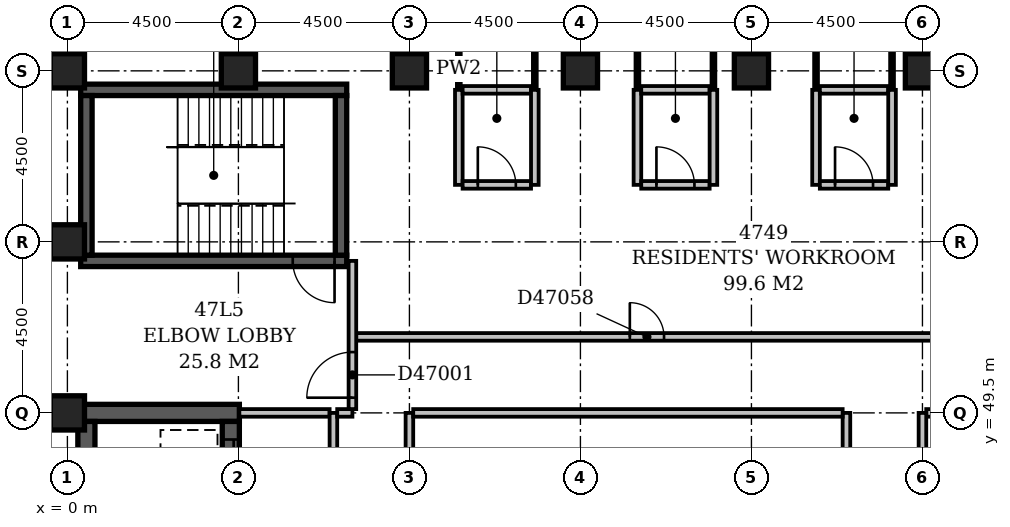
"""IFC4 building model, lengths in metres.
Left out: names, types, materials, properties, quantities, classifications, styles, units other than length and angle.
Written with IfcOpenShell. Run it as: python <this file> out.ifc"""

import sys

from ifc_helpers import new_model, si_unit, direction, frame, frame_2d, origin, origin_2d, place, context, subcontext, project, spatial, rectangle, extrude, element, fill, save


model = new_model("IFC4")
c1 = context("Model", 3, precision=1e-05, world=origin(), true_north=direction((0.0, 1.0)))
c2 = subcontext(c1, "Body", "Model", "MODEL_VIEW")
j1 = project(units=[si_unit("LENGTHUNIT", "METRE"), si_unit("PLANEANGLEUNIT", "RADIAN")], contexts=[c1])
p1 = place(None, origin())
s1 = spatial("IfcSite", under=j1, at=p1, CompositionType="ELEMENT")
p2 = place(p1, origin())
s2 = spatial("IfcBuilding", under=s1, at=p2, CompositionType="ELEMENT")
p3 = place(p2, frame((0.0, 0.0, 186.2)))
s3 = spatial("IfcBuildingStorey", under=s2, at=p3, CompositionType="ELEMENT", Elevation=186.2)
p4 = place(p3, frame((0.275, 49.5, -0.35), z_axis=(0.0, 0.0, 1.0), x_axis=(1.0, 0.0, 0.0)))
e1 = element("IfcWall", 1, at=p4, inside=s3, PredefinedType="SHEAR", context=c2, shape_type="SweptSolid", body=[
    extrude(rectangle(XDim=4.25, YDim=0.45, at=frame_2d((2.125, 0.0))), origin(), (0.0, 0.0, 1.0), 3.65),
])
p5 = place(p3, frame((0.35, 53.5, -0.35), z_axis=(0.0, 0.0, 1.0), x_axis=(1.0, 0.0, 0.0)))
e2 = element("IfcWall", 2, at=p5, inside=s3, PredefinedType="SHEAR", context=c2, shape_type="SweptSolid", body=[
    extrude(rectangle(XDim=7.0, YDim=0.3, at=frame_2d((3.5, 0.0))), origin(), (0.0, 0.0, 1.0), 3.65),
])
p6 = place(p5, frame((5.58, 0.0, 0.35)))
e3 = element("IfcOpeningElement", 3, at=p6, cuts=e2, PredefinedType="OPENING", context=c2, shape_type="SweptSolid", body=[
    extrude(rectangle(XDim=1.1, YDim=2.1, at=frame_2d((0.55, 1.05))), frame((0.0, 0.162, 0.0), z_axis=(0.0, -1.0, 0.0), x_axis=(1.0, 0.0, 0.0)), (0.0, 0.0, 1.0), 0.324),
])
p7 = place(p3, frame((0.35, 58.0, -0.35), z_axis=(0.0, 0.0, 1.0), x_axis=(1.0, 0.0, 0.0)))
e4 = element("IfcWall", 4, at=p7, inside=s3, PredefinedType="SHEAR", context=c2, shape_type="SweptSolid", body=[
    extrude(rectangle(XDim=7.0, YDim=0.3, at=frame_2d((3.5, 0.0))), origin(), (0.0, 0.0, 1.0), 3.65),
])
p8 = place(p3, frame((0.5, 27.15, -0.35), z_axis=(0.0, 0.0, 1.0), x_axis=(0.0, 1.0, 0.0)))
e5 = element("IfcWall", 5, at=p8, inside=s3, PredefinedType="SHEAR", context=c2, shape_type="SweptSolid", body=[
    extrude(rectangle(XDim=22.125, YDim=0.45, at=frame_2d((11.062, 0.0))), origin(), (0.0, 0.0, 1.0), 3.65),
])
p9 = place(p3, frame((0.5, 53.65, -0.35), z_axis=(0.0, 0.0, 1.0), x_axis=(0.0, 1.0, 0.0)))
e6 = element("IfcWall", 6, at=p9, inside=s3, PredefinedType="SHEAR", context=c2, shape_type="SweptSolid", body=[
    extrude(rectangle(XDim=4.2, YDim=0.3, at=frame_2d((2.1, 0.0))), origin(), (0.0, 0.0, 1.0), 3.65),
])
p10 = place(p3, frame((4.3, 27.15, -0.35), z_axis=(0.0, 0.0, 1.0), x_axis=(0.0, 1.0, 0.0)))
e7 = element("IfcWall", 7, at=p10, inside=s3, PredefinedType="SHEAR", context=c2, shape_type="SweptSolid", body=[
    extrude(rectangle(XDim=22.125, YDim=0.45, at=frame_2d((11.062, 0.0))), origin(), (0.0, 0.0, 1.0), 3.65),
])
p11 = place(p10, frame((3.05, 0.0, 0.35)))
e8 = element("IfcOpeningElement", 8, at=p11, cuts=e7, PredefinedType="OPENING", context=c2, shape_type="SweptSolid", body=[
    extrude(rectangle(XDim=1.1, YDim=2.1, at=frame_2d((0.55, 1.05))), frame((0.0, 0.237, 0.0), z_axis=(0.0, -1.0, 0.0), x_axis=(1.0, 0.0, 0.0)), (0.0, 0.0, 1.0), 0.474),
])
p12 = place(p10, frame((0.55, 0.0, 0.35)))
e9 = element("IfcOpeningElement", 9, at=p12, cuts=e7, PredefinedType="OPENING", context=c2, shape_type="SweptSolid", body=[
    extrude(rectangle(XDim=1.1, YDim=2.1, at=frame_2d((0.55, 1.05))), frame((0.0, 0.237, 0.0), z_axis=(0.0, -1.0, 0.0), x_axis=(1.0, 0.0, 0.0)), (0.0, 0.0, 1.0), 0.474),
])
p13 = place(p10, frame((20.55, 0.0, 0.35)))
e10 = element("IfcOpeningElement", 10, at=p13, cuts=e7, PredefinedType="OPENING", context=c2, shape_type="SweptSolid", body=[
    extrude(rectangle(XDim=1.1, YDim=2.1, at=frame_2d((0.55, 1.05))), frame((0.0, 0.237, 0.0), z_axis=(0.0, -1.0, 0.0), x_axis=(1.0, 0.0, 0.0)), (0.0, 0.0, 1.0), 0.474),
])
p14 = place(p10, frame((18.05, 0.0, 0.35)))
e11 = element("IfcOpeningElement", 11, at=p14, cuts=e7, PredefinedType="OPENING", context=c2, shape_type="SweptSolid", body=[
    extrude(rectangle(XDim=1.1, YDim=2.1, at=frame_2d((0.55, 1.05))), frame((0.0, 0.237, 0.0), z_axis=(0.0, -1.0, 0.0), x_axis=(1.0, 0.0, 0.0)), (0.0, 0.0, 1.0), 0.474),
])
p15 = place(p10, frame((15.55, 0.0, 0.35)))
e12 = element("IfcOpeningElement", 12, at=p15, cuts=e7, PredefinedType="OPENING", context=c2, shape_type="SweptSolid", body=[
    extrude(rectangle(XDim=1.1, YDim=2.1, at=frame_2d((0.55, 1.05))), frame((0.0, 0.237, 0.0), z_axis=(0.0, -1.0, 0.0), x_axis=(1.0, 0.0, 0.0)), (0.0, 0.0, 1.0), 0.474),
])
p16 = place(p10, frame((13.05, 0.0, 0.35)))
e13 = element("IfcOpeningElement", 13, at=p16, cuts=e7, PredefinedType="OPENING", context=c2, shape_type="SweptSolid", body=[
    extrude(rectangle(XDim=1.1, YDim=2.1, at=frame_2d((0.55, 1.05))), frame((0.0, 0.237, 0.0), z_axis=(0.0, -1.0, 0.0), x_axis=(1.0, 0.0, 0.0)), (0.0, 0.0, 1.0), 0.474),
])
p17 = place(p10, frame((10.55, 0.0, 0.35)))
e14 = element("IfcOpeningElement", 14, at=p17, cuts=e7, PredefinedType="OPENING", context=c2, shape_type="SweptSolid", body=[
    extrude(rectangle(XDim=1.1, YDim=2.1, at=frame_2d((0.55, 1.05))), frame((0.0, 0.237, 0.0), z_axis=(0.0, -1.0, 0.0), x_axis=(1.0, 0.0, 0.0)), (0.0, 0.0, 1.0), 0.474),
])
p18 = place(p10, frame((8.05, 0.0, 0.35)))
e15 = element("IfcOpeningElement", 15, at=p18, cuts=e7, PredefinedType="OPENING", context=c2, shape_type="SweptSolid", body=[
    extrude(rectangle(XDim=1.1, YDim=2.1, at=frame_2d((0.55, 1.05))), frame((0.0, 0.237, 0.0), z_axis=(0.0, -1.0, 0.0), x_axis=(1.0, 0.0, 0.0)), (0.0, 0.0, 1.0), 0.474),
])
p19 = place(p10, frame((5.55, 0.0, 0.35)))
e16 = element("IfcOpeningElement", 16, at=p19, cuts=e7, PredefinedType="OPENING", context=c2, shape_type="SweptSolid", body=[
    extrude(rectangle(XDim=1.1, YDim=2.1, at=frame_2d((0.55, 1.05))), frame((0.0, 0.237, 0.0), z_axis=(0.0, -1.0, 0.0), x_axis=(1.0, 0.0, 0.0)), (0.0, 0.0, 1.0), 0.474),
])
p20 = place(p3, frame((7.2, 53.65, -0.35), z_axis=(0.0, 0.0, 1.0), x_axis=(0.0, 1.0, 0.0)))
e17 = element("IfcWall", 17, at=p20, inside=s3, PredefinedType="SHEAR", context=c2, shape_type="SweptSolid", body=[
    extrude(rectangle(XDim=4.2, YDim=0.3, at=frame_2d((2.1, 0.0))), origin(), (0.0, 0.0, 1.0), 3.65),
])
for number, where, z_axis, x_axis in (
    (18, (0.0, 49.5, -0.35), (0.0, 0.0, 1.0), (1.0, 0.0, 0.0)),
    (19, (0.0, 54.0, -0.35), (0.0, 0.0, 1.0), (1.0, 0.0, 0.0)),
    (20, (0.0, 58.5, -0.35), (0.0, 0.0, 1.0), (1.0, 0.0, 0.0)),
    (21, (4.5, 58.5, -0.35), (0.0, 0.0, 1.0), (1.0, 0.0, 0.0)),
    (22, (9.0, 58.5, -0.35), (0.0, 0.0, 1.0), (1.0, 0.0, 0.0)),
    (23, (13.5, 58.5, -0.35), (0.0, 0.0, 1.0), (1.0, 0.0, 0.0)),
    (24, (18.0, 58.5, -0.35), (0.0, 0.0, 1.0), (1.0, 0.0, 0.0)),
    (25, (22.5, 58.5, -0.35), (0.0, 0.0, 1.0), (1.0, 0.0, 0.0)),
):
    element("IfcColumn", number, at=place(p3, frame(where, z_axis=z_axis, x_axis=x_axis)), inside=s3, PredefinedType="COLUMN", context=c2, shape_type="SweptSolid", body=[
        extrude(rectangle(XDim=0.9, YDim=0.9, at=origin_2d()), origin(), (0.0, 0.0, 1.0), 3.65),
    ])
p21 = place(p3, frame((7.0, 34.6, 0.0), z_axis=(0.0, 0.0, 1.0), x_axis=(0.0, 1.0, 0.0)))
e26 = element("IfcWall", 26, at=p21, inside=s3, PredefinedType="PARTITIONING", context=c2, shape_type="SweptSolid", body=[
    extrude(rectangle(XDim=14.9, YDim=0.2, at=frame_2d((7.45, 0.0))), origin(), (0.0, 0.0, 1.0), 3.3),
])
p22 = place(p21, frame((2.8, 0.0, 0.0)))
e27 = element("IfcOpeningElement", 27, at=p22, cuts=e26, PredefinedType="OPENING", context=c2, shape_type="SweptSolid", body=[
    extrude(rectangle(XDim=1.2, YDim=2.1, at=frame_2d((0.6, 1.05))), frame((0.0, 0.112, 0.0), z_axis=(0.0, -1.0, 0.0), x_axis=(1.0, 0.0, 0.0)), (0.0, 0.0, 1.0), 0.224),
])
p23 = place(p21, frame((9.8, 0.0, 0.0)))
e28 = element("IfcOpeningElement", 28, at=p23, cuts=e26, PredefinedType="OPENING", context=c2, shape_type="SweptSolid", body=[
    extrude(rectangle(XDim=1.2, YDim=2.1, at=frame_2d((0.6, 1.05))), frame((0.0, 0.112, 0.0), z_axis=(0.0, -1.0, 0.0), x_axis=(1.0, 0.0, 0.0)), (0.0, 0.0, 1.0), 0.224),
])
p24 = place(p3, frame((4.525, 49.5, 0.0), z_axis=(0.0, 0.0, 1.0), x_axis=(1.0, 0.0, 0.0)))
e29 = element("IfcWall", 29, at=p24, inside=s3, PredefinedType="PARTITIONING", context=c2, shape_type="SweptSolid", body=[
    extrude(rectangle(XDim=2.375, YDim=0.2, at=frame_2d((1.188, 0.0))), origin(), (0.0, 0.0, 1.0), 3.3),
])
p25 = place(p3, frame((7.1, 49.5, 0.0), z_axis=(0.0, 0.0, 1.0), x_axis=(1.0, 0.0, 0.0)))
e30 = element("IfcWall", 30, at=p25, inside=s3, PredefinedType="PARTITIONING", context=c2, shape_type="SweptSolid", body=[
    extrude(rectangle(XDim=0.4, YDim=0.2, at=frame_2d((0.2, 0.0))), origin(), (0.0, 0.0, 1.0), 3.3),
])
p26 = place(p3, frame((7.5, 49.6, 0.0), z_axis=(0.0, 0.0, 1.0), x_axis=(0.0, 1.0, 0.0)))
e31 = element("IfcWall", 31, at=p26, inside=s3, PredefinedType="PARTITIONING", context=c2, shape_type="SweptSolid", body=[
    extrude(rectangle(XDim=3.9, YDim=0.2, at=frame_2d((1.95, 0.0))), origin(), (0.0, 0.0, 1.0), 3.3),
])
p27 = place(p26, frame((0.3, 0.0, 0.0)))
e32 = element("IfcOpeningElement", 32, at=p27, cuts=e31, PredefinedType="OPENING", context=c2, shape_type="SweptSolid", body=[
    extrude(rectangle(XDim=1.2, YDim=2.1, at=frame_2d((0.6, 1.05))), frame((0.0, 0.112, 0.0), z_axis=(0.0, -1.0, 0.0), x_axis=(1.0, 0.0, 0.0)), (0.0, 0.0, 1.0), 0.224),
])
p28 = place(p3, frame((22.5, 36.45, 0.0), z_axis=(0.0, 0.0, 1.0), x_axis=(0.0, 1.0, 0.0)))
e33 = element("IfcWall", 33, at=p28, inside=s3, PredefinedType="PARTITIONING", context=c2, shape_type="SweptSolid", body=[
    extrude(rectangle(XDim=13.05, YDim=0.2, at=frame_2d((6.525, 0.0))), origin(), (0.0, 0.0, 1.0), 3.3),
])
p29 = place(p3, frame((9.0, 38.0, 0.0), z_axis=(0.0, 0.0, 1.0), x_axis=(0.0, 1.0, 0.0)))
e34 = element("IfcWall", 34, at=p29, inside=s3, PredefinedType="PARTITIONING", context=c2, shape_type="SweptSolid", body=[
    extrude(rectangle(XDim=11.5, YDim=0.2, at=frame_2d((5.75, 0.0))), origin(), (0.0, 0.0, 1.0), 3.3),
])
p30 = place(p29, frame((5.25, 0.0, 0.0)))
e35 = element("IfcOpeningElement", 35, at=p30, cuts=e34, PredefinedType="OPENING", context=c2, shape_type="SweptSolid", body=[
    extrude(rectangle(XDim=0.9, YDim=2.1, at=frame_2d((0.45, 1.05))), frame((0.0, 0.112, 0.0), z_axis=(0.0, -1.0, 0.0), x_axis=(1.0, 0.0, 0.0)), (0.0, 0.0, 1.0), 0.224),
])
p31 = place(p3, frame((20.5, 38.0, 0.0), z_axis=(0.0, 0.0, 1.0), x_axis=(0.0, 1.0, 0.0)))
e36 = element("IfcWall", 36, at=p31, inside=s3, PredefinedType="PARTITIONING", context=c2, shape_type="SweptSolid", body=[
    extrude(rectangle(XDim=11.5, YDim=0.2, at=frame_2d((5.75, 0.0))), origin(), (0.0, 0.0, 1.0), 3.3),
])
p32 = place(p3, frame((9.1, 49.5, 0.0), z_axis=(0.0, 0.0, 1.0), x_axis=(1.0, 0.0, 0.0)))
e37 = element("IfcWall", 37, at=p32, inside=s3, PredefinedType="PARTITIONING", context=c2, shape_type="SweptSolid", body=[
    extrude(rectangle(XDim=11.3, YDim=0.2, at=frame_2d((5.65, 0.0))), origin(), (0.0, 0.0, 1.0), 3.3),
])
p33 = place(p3, frame((22.6, 49.5, 0.0), z_axis=(0.0, 0.0, 1.0), x_axis=(1.0, 0.0, 0.0)))
e38 = element("IfcWall", 38, at=p33, inside=s3, PredefinedType="PARTITIONING", context=c2, shape_type="SweptSolid", body=[
    extrude(rectangle(XDim=30.95, YDim=0.2, at=frame_2d((15.475, 0.0))), origin(), (0.0, 0.0, 1.0), 3.3),
])
p34 = place(p33, frame((6.1, 0.0, 0.0)))
e39 = element("IfcOpeningElement", 39, at=p34, cuts=e38, PredefinedType="OPENING", context=c2, shape_type="SweptSolid", body=[
    extrude(rectangle(XDim=1.0, YDim=2.1, at=frame_2d((0.5, 1.05))), frame((0.0, 0.112, 0.0), z_axis=(0.0, -1.0, 0.0), x_axis=(1.0, 0.0, 0.0)), (0.0, 0.0, 1.0), 0.224),
])
p35 = place(p33, frame((13.7, 0.0, 0.0)))
e40 = element("IfcOpeningElement", 40, at=p35, cuts=e38, PredefinedType="OPENING", context=c2, shape_type="SweptSolid", body=[
    extrude(rectangle(XDim=1.0, YDim=2.1, at=frame_2d((0.5, 1.05))), frame((0.0, 0.112, 0.0), z_axis=(0.0, -1.0, 0.0), x_axis=(1.0, 0.0, 0.0)), (0.0, 0.0, 1.0), 0.224),
])
p36 = place(p33, frame((27.15, 0.0, 0.0)))
e41 = element("IfcOpeningElement", 41, at=p36, cuts=e38, PredefinedType="OPENING", context=c2, shape_type="SweptSolid", body=[
    extrude(rectangle(XDim=1.0, YDim=2.1, at=frame_2d((0.5, 1.05))), frame((0.0, 0.112, 0.0), z_axis=(0.0, -1.0, 0.0), x_axis=(1.0, 0.0, 0.0)), (0.0, 0.0, 1.0), 0.224),
])
p37 = place(p3, frame((7.6, 51.5, 0.0), z_axis=(0.0, 0.0, 1.0), x_axis=(1.0, 0.0, 0.0)))
e42 = element("IfcWall", 42, at=p37, inside=s3, PredefinedType="PARTITIONING", context=c2, shape_type="SweptSolid", body=[
    extrude(rectangle(XDim=15.3, YDim=0.2, at=frame_2d((7.65, 0.0))), origin(), (0.0, 0.0, 1.0), 3.3),
])
p38 = place(p37, frame((7.2, 0.0, 0.0)))
e43 = element("IfcOpeningElement", 43, at=p38, cuts=e42, PredefinedType="OPENING", context=c2, shape_type="SweptSolid", body=[
    extrude(rectangle(XDim=0.9, YDim=2.1, at=frame_2d((0.45, 1.05))), frame((0.0, 0.112, 0.0), z_axis=(0.0, -1.0, 0.0), x_axis=(1.0, 0.0, 0.0)), (0.0, 0.0, 1.0), 0.224),
])
p39 = place(p3, frame((10.3, 55.5, 0.0), z_axis=(0.0, 0.0, 1.0), x_axis=(0.0, 1.0, 0.0)))
e44 = element("IfcWall", 44, at=p39, inside=s3, PredefinedType="PARTITIONING", context=c2, shape_type="SweptSolid", body=[
    extrude(rectangle(XDim=2.5, YDim=0.2, at=frame_2d((1.25, 0.0))), origin(), (0.0, 0.0, 1.0), 3.3),
])
p40 = place(p3, frame((10.4, 55.5, 0.0), z_axis=(0.0, 0.0, 1.0), x_axis=(1.0, 0.0, 0.0)))
e45 = element("IfcWall", 45, at=p40, inside=s3, PredefinedType="PARTITIONING", context=c2, shape_type="SweptSolid", body=[
    extrude(rectangle(XDim=1.8, YDim=0.2, at=frame_2d((0.9, 0.0))), origin(), (0.0, 0.0, 1.0), 3.3),
])
p41 = place(p40, frame((0.4, 0.0, 0.0)))
e46 = element("IfcOpeningElement", 46, at=p41, cuts=e45, PredefinedType="OPENING", context=c2, shape_type="SweptSolid", body=[
    extrude(rectangle(XDim=1.0, YDim=2.1, at=frame_2d((0.5, 1.05))), frame((0.0, 0.112, 0.0), z_axis=(0.0, -1.0, 0.0), x_axis=(1.0, 0.0, 0.0)), (0.0, 0.0, 1.0), 0.224),
])
for number, where, z_axis, x_axis in (
    (47, (12.3, 55.5, 0.0), (0.0, 0.0, 1.0), (0.0, 1.0, 0.0)),
    (48, (15.0, 55.5, 0.0), (0.0, 0.0, 1.0), (0.0, 1.0, 0.0)),
):
    element("IfcWall", number, at=place(p3, frame(where, z_axis=z_axis, x_axis=x_axis)), inside=s3, PredefinedType="PARTITIONING", context=c2, shape_type="SweptSolid", body=[
        extrude(rectangle(XDim=2.5, YDim=0.2, at=frame_2d((1.25, 0.0))), origin(), (0.0, 0.0, 1.0), 3.3),
    ])
p42 = place(p3, frame((15.1, 55.5, 0.0), z_axis=(0.0, 0.0, 1.0), x_axis=(1.0, 0.0, 0.0)))
e49 = element("IfcWall", 49, at=p42, inside=s3, PredefinedType="PARTITIONING", context=c2, shape_type="SweptSolid", body=[
    extrude(rectangle(XDim=1.8, YDim=0.2, at=frame_2d((0.9, 0.0))), origin(), (0.0, 0.0, 1.0), 3.3),
])
p43 = place(p42, frame((0.4, 0.0, 0.0)))
e50 = element("IfcOpeningElement", 50, at=p43, cuts=e49, PredefinedType="OPENING", context=c2, shape_type="SweptSolid", body=[
    extrude(rectangle(XDim=1.0, YDim=2.1, at=frame_2d((0.5, 1.05))), frame((0.0, 0.112, 0.0), z_axis=(0.0, -1.0, 0.0), x_axis=(1.0, 0.0, 0.0)), (0.0, 0.0, 1.0), 0.224),
])
for number, where, z_axis, x_axis in (
    (51, (17.0, 55.5, 0.0), (0.0, 0.0, 1.0), (0.0, 1.0, 0.0)),
    (52, (19.7, 55.5, 0.0), (0.0, 0.0, 1.0), (0.0, 1.0, 0.0)),
):
    element("IfcWall", number, at=place(p3, frame(where, z_axis=z_axis, x_axis=x_axis)), inside=s3, PredefinedType="PARTITIONING", context=c2, shape_type="SweptSolid", body=[
        extrude(rectangle(XDim=2.5, YDim=0.2, at=frame_2d((1.25, 0.0))), origin(), (0.0, 0.0, 1.0), 3.3),
    ])
p44 = place(p3, frame((19.8, 55.5, 0.0), z_axis=(0.0, 0.0, 1.0), x_axis=(1.0, 0.0, 0.0)))
e53 = element("IfcWall", 53, at=p44, inside=s3, PredefinedType="PARTITIONING", context=c2, shape_type="SweptSolid", body=[
    extrude(rectangle(XDim=1.8, YDim=0.2, at=frame_2d((0.9, 0.0))), origin(), (0.0, 0.0, 1.0), 3.3),
])
p45 = place(p44, frame((0.4, 0.0, 0.0)))
e54 = element("IfcOpeningElement", 54, at=p45, cuts=e53, PredefinedType="OPENING", context=c2, shape_type="SweptSolid", body=[
    extrude(rectangle(XDim=1.0, YDim=2.1, at=frame_2d((0.5, 1.05))), frame((0.0, 0.112, 0.0), z_axis=(0.0, -1.0, 0.0), x_axis=(1.0, 0.0, 0.0)), (0.0, 0.0, 1.0), 0.224),
])
p46 = place(p3, frame((21.7, 55.5, 0.0), z_axis=(0.0, 0.0, 1.0), x_axis=(0.0, 1.0, 0.0)))
e55 = element("IfcWall", 55, at=p46, inside=s3, PredefinedType="PARTITIONING", context=c2, shape_type="SweptSolid", body=[
    extrude(rectangle(XDim=2.5, YDim=0.2, at=frame_2d((1.25, 0.0))), origin(), (0.0, 0.0, 1.0), 3.3),
])
p47 = place(p3, frame((10.3, 58.0, 0.0), z_axis=(0.0, 0.0, 1.0), x_axis=(0.0, 1.0, 0.0)))
e56 = element("IfcWall", 56, at=p47, inside=s3, PredefinedType="PARTITIONING", context=c2, shape_type="SweptSolid", body=[
    extrude(rectangle(XDim=1.1, YDim=0.1, at=frame_2d((0.55, 0.0))), origin(), (0.0, 0.0, 1.0), 3.3),
])
p48 = place(p3, frame((10.4, 58.0, 0.0), z_axis=(0.0, 0.0, 1.0), x_axis=(1.0, 0.0, 0.0)))
e57 = element("IfcWall", 57, at=p48, inside=s3, PredefinedType="PARTITIONING", context=c2, shape_type="SweptSolid", body=[
    extrude(rectangle(XDim=1.8, YDim=0.2, at=frame_2d((0.9, 0.0))), origin(), (0.0, 0.0, 1.0), 3.3),
])
for number, where, z_axis, x_axis in (
    (58, (12.3, 58.0, 0.0), (0.0, 0.0, 1.0), (0.0, 1.0, 0.0)),
    (59, (15.0, 58.0, 0.0), (0.0, 0.0, 1.0), (0.0, 1.0, 0.0)),
):
    element("IfcWall", number, at=place(p3, frame(where, z_axis=z_axis, x_axis=x_axis)), inside=s3, PredefinedType="PARTITIONING", context=c2, shape_type="SweptSolid", body=[
        extrude(rectangle(XDim=1.1, YDim=0.1, at=frame_2d((0.55, 0.0))), origin(), (0.0, 0.0, 1.0), 3.3),
    ])
p49 = place(p3, frame((15.1, 58.0, 0.0), z_axis=(0.0, 0.0, 1.0), x_axis=(1.0, 0.0, 0.0)))
e60 = element("IfcWall", 60, at=p49, inside=s3, PredefinedType="PARTITIONING", context=c2, shape_type="SweptSolid", body=[
    extrude(rectangle(XDim=1.8, YDim=0.2, at=frame_2d((0.9, 0.0))), origin(), (0.0, 0.0, 1.0), 3.3),
])
for number, where, z_axis, x_axis in (
    (61, (17.0, 58.0, 0.0), (0.0, 0.0, 1.0), (0.0, 1.0, 0.0)),
    (62, (19.7, 58.0, 0.0), (0.0, 0.0, 1.0), (0.0, 1.0, 0.0)),
):
    element("IfcWall", number, at=place(p3, frame(where, z_axis=z_axis, x_axis=x_axis)), inside=s3, PredefinedType="PARTITIONING", context=c2, shape_type="SweptSolid", body=[
        extrude(rectangle(XDim=1.1, YDim=0.1, at=frame_2d((0.55, 0.0))), origin(), (0.0, 0.0, 1.0), 3.3),
    ])
p50 = place(p3, frame((19.8, 58.0, 0.0), z_axis=(0.0, 0.0, 1.0), x_axis=(1.0, 0.0, 0.0)))
e63 = element("IfcWall", 63, at=p50, inside=s3, PredefinedType="PARTITIONING", context=c2, shape_type="SweptSolid", body=[
    extrude(rectangle(XDim=1.8, YDim=0.2, at=frame_2d((0.9, 0.0))), origin(), (0.0, 0.0, 1.0), 3.3),
])
p51 = place(p3, frame((21.7, 58.0, 0.0), z_axis=(0.0, 0.0, 1.0), x_axis=(0.0, 1.0, 0.0)))
e64 = element("IfcWall", 64, at=p51, inside=s3, PredefinedType="PARTITIONING", context=c2, shape_type="SweptSolid", body=[
    extrude(rectangle(XDim=1.1, YDim=0.1, at=frame_2d((0.55, 0.0))), origin(), (0.0, 0.0, 1.0), 3.3),
])
p52 = place(p27, origin())
e65 = element("IfcDoor", 65, at=p52, inside=s3, OperationType="SINGLE_SWING_LEFT", PredefinedType="DOOR", context=c2, shape_type="SweptSolid", body=[
    extrude(rectangle(XDim=1.2, YDim=2.1, at=frame_2d((0.6, 1.05))), frame((0.0, 0.025, 0.0), z_axis=(0.0, -1.0, 0.0), x_axis=(1.0, 0.0, 0.0)), (0.0, 0.0, 1.0), 0.05),
])
fill(e32, e65)
p53 = place(p13, origin())
e66 = element("IfcDoor", 66, at=p53, inside=s3, OperationType="SLIDING_TO_LEFT", PredefinedType="DOOR", context=c2, shape_type="SweptSolid", body=[
    extrude(rectangle(XDim=1.1, YDim=2.1, at=frame_2d((0.55, 1.05))), frame((0.0, 0.025, 0.0), z_axis=(0.0, -1.0, 0.0), x_axis=(1.0, 0.0, 0.0)), (0.0, 0.0, 1.0), 0.05),
])
fill(e10, e66)
p54 = place(p6, origin())
e67 = element("IfcDoor", 67, at=p54, inside=s3, OperationType="SINGLE_SWING_RIGHT", PredefinedType="DOOR", context=c2, shape_type="SweptSolid", body=[
    extrude(rectangle(XDim=1.1, YDim=2.1, at=frame_2d((0.55, 1.05))), frame((0.0, 0.025, 0.0), z_axis=(0.0, -1.0, 0.0), x_axis=(1.0, 0.0, 0.0)), (0.0, 0.0, 1.0), 0.05),
])
fill(e3, e67)
p55 = place(p38, origin())
e68 = element("IfcDoor", 68, at=p55, inside=s3, OperationType="SINGLE_SWING_LEFT", PredefinedType="DOOR", context=c2, shape_type="SweptSolid", body=[
    extrude(rectangle(XDim=0.9, YDim=2.1, at=frame_2d((0.45, 1.05))), frame((0.0, 0.025, 0.0), z_axis=(0.0, -1.0, 0.0), x_axis=(1.0, 0.0, 0.0)), (0.0, 0.0, 1.0), 0.05),
])
fill(e43, e68)
p56 = place(p41, origin())
e69 = element("IfcDoor", 69, at=p56, inside=s3, OperationType="SINGLE_SWING_LEFT", PredefinedType="DOOR", context=c2, shape_type="SweptSolid", body=[
    extrude(rectangle(XDim=1.0, YDim=2.1, at=frame_2d((0.5, 1.05))), frame((0.0, 0.025, 0.0), z_axis=(0.0, -1.0, 0.0), x_axis=(1.0, 0.0, 0.0)), (0.0, 0.0, 1.0), 0.05),
])
fill(e46, e69)
p57 = place(p43, origin())
e70 = element("IfcDoor", 70, at=p57, inside=s3, OperationType="SINGLE_SWING_LEFT", PredefinedType="DOOR", context=c2, shape_type="SweptSolid", body=[
    extrude(rectangle(XDim=1.0, YDim=2.1, at=frame_2d((0.5, 1.05))), frame((0.0, 0.025, 0.0), z_axis=(0.0, -1.0, 0.0), x_axis=(1.0, 0.0, 0.0)), (0.0, 0.0, 1.0), 0.05),
])
fill(e50, e70)
p58 = place(p45, origin())
e71 = element("IfcDoor", 71, at=p58, inside=s3, OperationType="SINGLE_SWING_LEFT", PredefinedType="DOOR", context=c2, shape_type="SweptSolid", body=[
    extrude(rectangle(XDim=1.0, YDim=2.1, at=frame_2d((0.5, 1.05))), frame((0.0, 0.025, 0.0), z_axis=(0.0, -1.0, 0.0), x_axis=(1.0, 0.0, 0.0)), (0.0, 0.0, 1.0), 0.05),
])
fill(e54, e71)
save(model, sys.argv[1])
